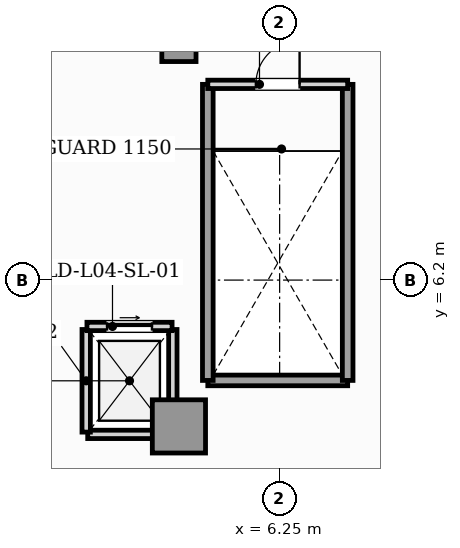
"""IFC4 building model, lengths in metres.
Left out: names, types, materials, properties, quantities, classifications, styles, units other than length and angle.
Written with IfcOpenShell. Run it as: python <this file> out.ifc"""

import sys

from ifc_helpers import new_model, si_unit, direction, frame, frame_2d, origin, origin_2d, place, context, subcontext, project, spatial, rectangle, hollow_rectangle, extrude, element, fill, save


model = new_model("IFC4")
c1 = context("Model", 3, precision=1e-05, world=origin(), true_north=direction((0.0, 1.0)))
c2 = subcontext(c1, "Body", "Model", "MODEL_VIEW")
j1 = project(units=[si_unit("LENGTHUNIT", "METRE"), si_unit("PLANEANGLEUNIT", "RADIAN")], contexts=[c1])
p1 = place(None, origin())
s1 = spatial("IfcSite", under=j1, at=p1, CompositionType="ELEMENT")
p2 = place(p1, origin())
s2 = spatial("IfcBuilding", under=s1, at=p2, CompositionType="ELEMENT")
p3 = place(p2, frame((0.0, 0.0, 19.8)))
s3 = spatial("IfcBuildingStorey", under=s2, at=p3, CompositionType="ELEMENT", Elevation=19.8)
p4 = place(p3, frame((3.6, 2.35, 0.0), z_axis=(0.0, 0.0, 1.0), x_axis=(1.0, 0.0, 0.0)))
e1 = element("IfcColumn", 1, at=p4, inside=s3, PredefinedType="USERDEFINED", context=c2, shape_type="SweptSolid", body=[
    extrude(hollow_rectangle(XDim=1.4, YDim=1.4, WallThickness=0.08, at=origin_2d()), origin(), (0.0, 0.0, 1.0), 4.8),
])
p5 = place(p3, frame((3.6, 12.4, 0.0), z_axis=(0.0, 0.0, 1.0), x_axis=(1.0, 0.0, 0.0)))
e2 = element("IfcColumn", 2, at=p5, inside=s3, PredefinedType="COLUMN", context=c2, shape_type="SweptSolid", body=[
    extrude(rectangle(XDim=0.9, YDim=0.9, at=origin_2d()), origin(), (0.0, 0.0, 1.0), 4.8),
])
p6 = place(p3, frame((1.2, 2.14, 0.0), z_axis=(0.0, 0.0, 1.0), x_axis=(1.0, 0.0, 0.0)))
e3 = element("IfcWall", 3, at=p6, inside=s3, PredefinedType="SOLIDWALL", context=c2, shape_type="SweptSolid", body=[
    extrude(rectangle(XDim=2.2, YDim=0.22, at=frame_2d((1.1, 0.0))), origin(), (0.0, 0.0, 1.0), 4.4),
])
p7 = place(p3, frame((1.16, 2.2, 0.0), z_axis=(0.0, 0.0, 1.0), x_axis=(0.0, 1.0, 0.0)))
e4 = element("IfcWall", 4, at=p7, inside=s3, PredefinedType="SOLIDWALL", context=c2, shape_type="SweptSolid", body=[
    extrude(rectangle(XDim=2.7, YDim=0.22, at=frame_2d((1.35, 0.0))), origin(), (0.0, 0.0, 1.0), 4.4),
])
p8 = place(p3, frame((3.44, 2.2, 0.0), z_axis=(0.0, 0.0, 1.0), x_axis=(0.0, 1.0, 0.0)))
e5 = element("IfcWall", 5, at=p8, inside=s3, PredefinedType="SOLIDWALL", context=c2, shape_type="SweptSolid", body=[
    extrude(rectangle(XDim=2.7, YDim=0.22, at=frame_2d((1.35, 0.0))), origin(), (0.0, 0.0, 1.0), 3.867),
])
p9 = place(p3, frame((1.18, 4.98, 0.0), z_axis=(0.0, 0.0, 1.0), x_axis=(1.0, 0.0, 0.0)))
e6 = element("IfcWall", 6, at=p9, inside=s3, PredefinedType="SOLIDWALL", context=c2, shape_type="SweptSolid", body=[
    extrude(rectangle(XDim=2.24, YDim=0.22, at=frame_2d((1.12, 0.0))), origin(), (0.0, 0.0, 1.0), 4.4),
])
p10 = place(p9, frame((0.53, 0.0, 0.0)))
e7 = element("IfcOpeningElement", 7, at=p10, cuts=e6, PredefinedType="OPENING", context=c2, shape_type="SweptSolid", body=[
    extrude(rectangle(XDim=1.18, YDim=2.2, at=frame_2d((0.59, 1.1))), frame((0.0, 0.12, 0.0), z_axis=(0.0, -1.0, 0.0), x_axis=(1.0, 0.0, 0.0)), (0.0, 0.0, 1.0), 0.24),
])
p11 = place(p3, frame((4.36, 3.56, 0.0), z_axis=(0.0, 0.0, 1.0), x_axis=(1.0, 0.0, 0.0)))
e8 = element("IfcWall", 8, at=p11, inside=s3, PredefinedType="SHEAR", context=c2, shape_type="SweptSolid", body=[
    extrude(rectangle(XDim=3.68, YDim=0.28, at=frame_2d((1.84, 0.0))), origin(), (0.0, 0.0, 1.0), 4.4),
])
for number, where, z_axis, x_axis in (
    (9, (4.36, 3.56, 0.0), (0.0, 0.0, 1.0), (0.0, 1.0, 0.0)),
    (10, (8.04, 3.56, 0.0), (0.0, 0.0, 1.0), (0.0, 1.0, 0.0)),
):
    element("IfcWall", number, at=place(p3, frame(where, z_axis=z_axis, x_axis=x_axis)), inside=s3, PredefinedType="SHEAR", context=c2, shape_type="SweptSolid", body=[
        extrude(rectangle(XDim=7.79, YDim=0.28, at=frame_2d((3.895, 0.0))), origin(), (0.0, 0.0, 1.0), 4.4),
    ])
p12 = place(p3, frame((4.36, 11.35, 0.0), z_axis=(0.0, 0.0, 1.0), x_axis=(1.0, 0.0, 0.0)))
e11 = element("IfcWall", 11, at=p12, inside=s3, PredefinedType="SOLIDWALL", context=c2, shape_type="SweptSolid", body=[
    extrude(rectangle(XDim=3.68, YDim=0.22, at=frame_2d((1.84, 0.0))), origin(), (0.0, 0.0, 1.0), 4.4),
])
p13 = place(p12, frame((1.265, 0.0, 0.0)))
e12 = element("IfcOpeningElement", 12, at=p13, cuts=e11, PredefinedType="OPENING", context=c2, shape_type="SweptSolid", body=[
    extrude(rectangle(XDim=1.15, YDim=2.2, at=frame_2d((0.575, 1.1))), frame((0.0, 0.12, 0.0), z_axis=(0.0, -1.0, 0.0), x_axis=(1.0, 0.0, 0.0)), (0.0, 0.0, 1.0), 0.24),
])
p14 = place(p10, origin())
e13 = element("IfcDoor", 13, at=p14, inside=s3, OperationType="SLIDING_TO_RIGHT", PredefinedType="DOOR", context=c2, shape_type="SweptSolid", body=[
    extrude(rectangle(XDim=1.18, YDim=2.2, at=frame_2d((0.59, 1.1))), frame((0.0, 0.025, 0.0), z_axis=(0.0, -1.0, 0.0), x_axis=(1.0, 0.0, 0.0)), (0.0, 0.0, 1.0), 0.05),
])
fill(e7, e13)
p15 = place(p13, origin())
e14 = element("IfcDoor", 14, at=p15, inside=s3, OperationType="SINGLE_SWING_RIGHT", PredefinedType="DOOR", context=c2, shape_type="SweptSolid", body=[
    extrude(rectangle(XDim=1.15, YDim=2.2, at=frame_2d((0.575, 1.1))), frame((0.0, 0.025, 0.0), z_axis=(0.0, -1.0, 0.0), x_axis=(1.0, 0.0, 0.0)), (0.0, 0.0, 1.0), 0.05),
])
fill(e12, e14)
save(model, sys.argv[1])
